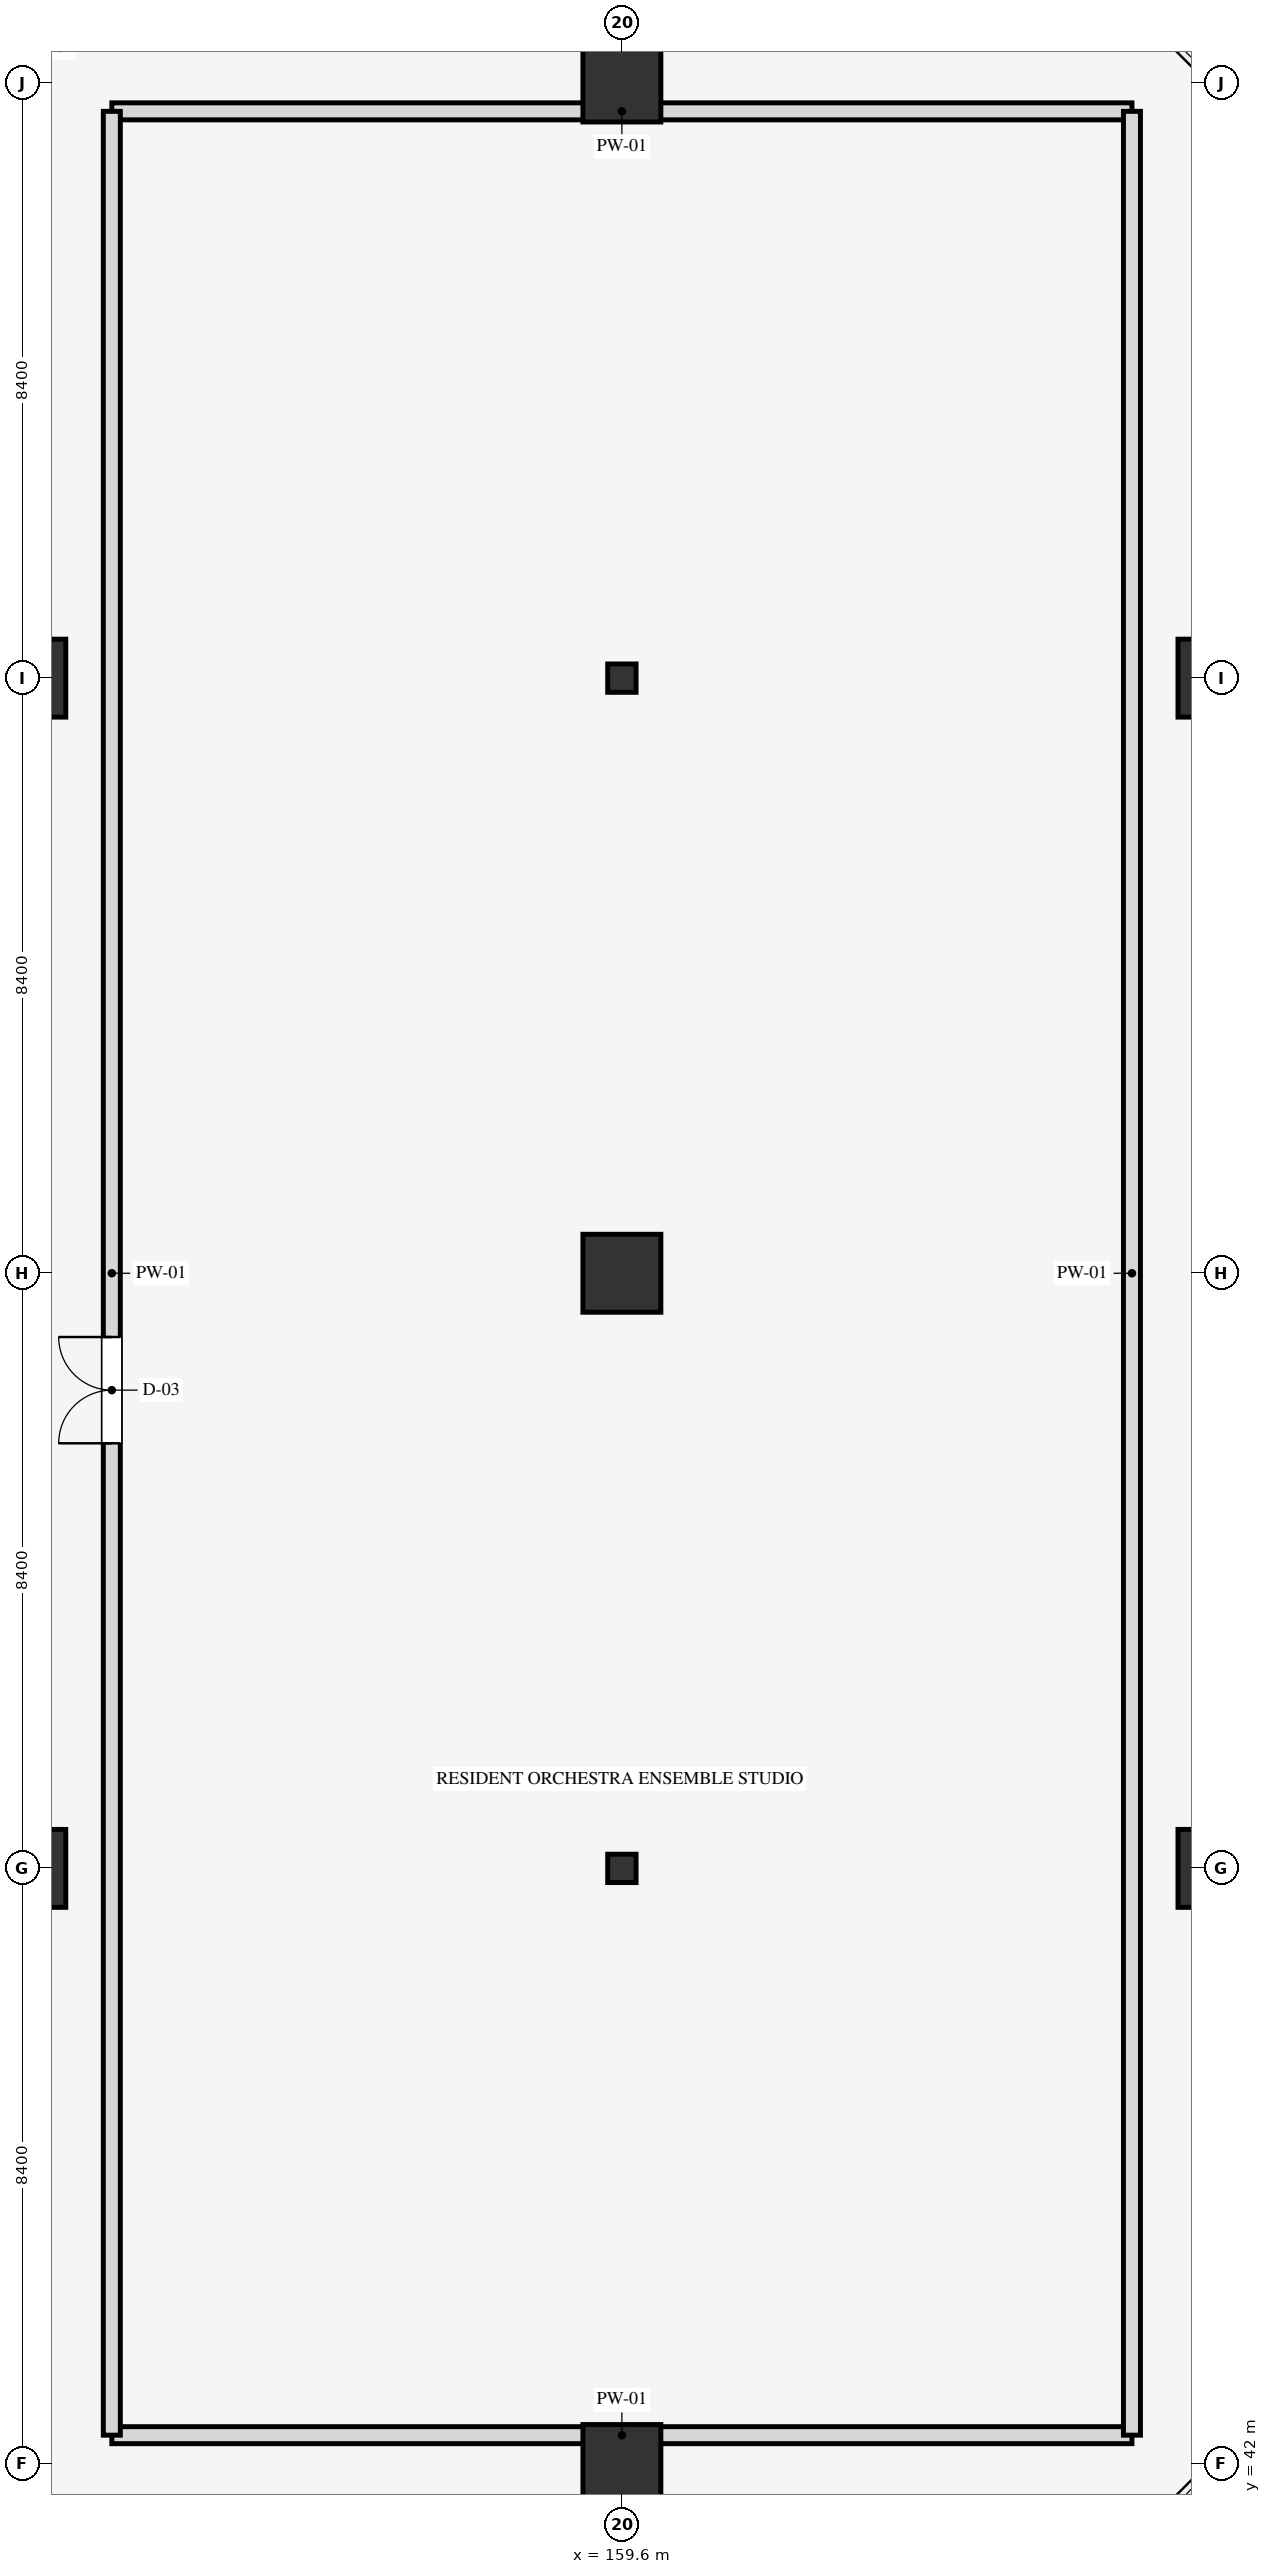
"""IFC4 building model, lengths in metres.
Left out: names, types, materials, properties, quantities, classifications, styles, units other than length and angle.
Written with IfcOpenShell. Run it as: python <this file> out.ifc"""

import sys

from ifc_helpers import new_model, si_unit, direction, frame, frame_2d, origin, origin_2d, place, context, subcontext, project, spatial, rectangle, i_section, extrude, element, fill, save


model = new_model("IFC4")
c1 = context("Model", 3, precision=1e-05, world=origin(), true_north=direction((0.0, 1.0)))
c2 = subcontext(c1, "Body", "Model", "MODEL_VIEW")
j1 = project(units=[si_unit("LENGTHUNIT", "METRE"), si_unit("PLANEANGLEUNIT", "RADIAN")], contexts=[c1])
p1 = place(None, origin())
s1 = spatial("IfcSite", under=j1, at=p1, CompositionType="ELEMENT")
p2 = place(p1, origin())
s2 = spatial("IfcBuilding", under=s1, at=p2, CompositionType="ELEMENT")
p3 = place(p2, frame((0.0, 0.0, 23.4)))
s3 = spatial("IfcBuildingStorey", under=s2, at=p3, CompositionType="ELEMENT", Elevation=23.4)
for number, where, z_axis, x_axis in (
    (1, (151.2, 50.4, 0.0), (0.0, 0.0, 1.0), (1.0, 0.0, 0.0)),
    (2, (151.2, 67.2, 0.0), (0.0, 0.0, 1.0), (1.0, 0.0, 0.0)),
    (3, (159.6, 42.0, 0.0), (0.0, 0.0, 1.0), (1.0, 0.0, 0.0)),
):
    element("IfcColumn", number, at=place(p3, frame(where, z_axis=z_axis, x_axis=x_axis)), inside=s3, PredefinedType="COLUMN", context=c2, shape_type="SweptSolid", body=[
        extrude(rectangle(XDim=1.1, YDim=1.1, at=origin_2d()), origin(), (0.0, 0.0, 1.0), 4.5),
    ])
p4 = place(p3, frame((159.6, 50.4, 0.0), z_axis=(0.0, 0.0, 1.0), x_axis=(1.0, 0.0, 0.0)))
e4 = element("IfcColumn", 4, at=p4, inside=s3, PredefinedType="COLUMN", context=c2, shape_type="SweptSolid", body=[
    extrude(i_section(OverallWidth=0.4, OverallDepth=0.4, WebThickness=0.013, FlangeThickness=0.021, FilletRadius=0.022, at=origin_2d()), origin(), (0.0, 0.0, 1.0), 4.5),
])
p5 = place(p3, frame((159.6, 58.8, 0.0), z_axis=(0.0, 0.0, 1.0), x_axis=(1.0, 0.0, 0.0)))
e5 = element("IfcColumn", 5, at=p5, inside=s3, PredefinedType="COLUMN", context=c2, shape_type="SweptSolid", body=[
    extrude(rectangle(XDim=1.1, YDim=1.1, at=origin_2d()), origin(), (0.0, 0.0, 1.0), 4.5),
])
p6 = place(p3, frame((159.6, 67.2, 0.0), z_axis=(0.0, 0.0, 1.0), x_axis=(1.0, 0.0, 0.0)))
e6 = element("IfcColumn", 6, at=p6, inside=s3, PredefinedType="COLUMN", context=c2, shape_type="SweptSolid", body=[
    extrude(i_section(OverallWidth=0.4, OverallDepth=0.4, WebThickness=0.013, FlangeThickness=0.021, FilletRadius=0.022, at=origin_2d()), origin(), (0.0, 0.0, 1.0), 4.5),
])
for number, where, z_axis, x_axis in (
    (7, (159.6, 75.6, 0.0), (0.0, 0.0, 1.0), (1.0, 0.0, 0.0)),
    (8, (168.0, 50.4, 0.0), (0.0, 0.0, 1.0), (1.0, 0.0, 0.0)),
    (9, (168.0, 67.2, 0.0), (0.0, 0.0, 1.0), (1.0, 0.0, 0.0)),
):
    element("IfcColumn", number, at=place(p3, frame(where, z_axis=z_axis, x_axis=x_axis)), inside=s3, PredefinedType="COLUMN", context=c2, shape_type="SweptSolid", body=[
        extrude(rectangle(XDim=1.1, YDim=1.1, at=origin_2d()), origin(), (0.0, 0.0, 1.0), 4.5),
    ])
for number, where, z_axis, x_axis in (
    (10, (152.4, 42.4, 0.0), (0.0, 0.0, 1.0), (1.0, 0.0, 0.0)),
    (11, (152.4, 75.2, 0.0), (0.0, 0.0, 1.0), (1.0, 0.0, 0.0)),
):
    element("IfcWall", number, at=place(p3, frame(where, z_axis=z_axis, x_axis=x_axis)), inside=s3, PredefinedType="PARTITIONING", context=c2, shape_type="SweptSolid", body=[
        extrude(rectangle(XDim=14.4, YDim=0.24, at=frame_2d((7.2, 0.0))), origin(), (0.0, 0.0, 1.0), 3.54),
    ])
p7 = place(p3, frame((152.4, 42.4, 0.0), z_axis=(0.0, 0.0, 1.0), x_axis=(0.0, 1.0, 0.0)))
e12 = element("IfcWall", 12, at=p7, inside=s3, PredefinedType="PARTITIONING", context=c2, shape_type="SweptSolid", body=[
    extrude(rectangle(XDim=32.8, YDim=0.24, at=frame_2d((16.4, 0.0))), origin(), (0.0, 0.0, 1.0), 3.54),
])
p8 = place(p7, frame((14.0, 0.0, 0.0)))
e13 = element("IfcOpeningElement", 13, at=p8, cuts=e12, PredefinedType="OPENING", context=c2, shape_type="SweptSolid", body=[
    extrude(rectangle(XDim=1.5, YDim=2.2, at=frame_2d((0.75, 1.1))), frame((0.0, 0.13, 0.0), z_axis=(0.0, -1.0, 0.0), x_axis=(1.0, 0.0, 0.0)), (0.0, 0.0, 1.0), 0.26),
])
p9 = place(p3, frame((166.8, 42.4, 0.0), z_axis=(0.0, 0.0, 1.0), x_axis=(0.0, 1.0, 0.0)))
e14 = element("IfcWall", 14, at=p9, inside=s3, PredefinedType="PARTITIONING", context=c2, shape_type="SweptSolid", body=[
    extrude(rectangle(XDim=32.8, YDim=0.24, at=frame_2d((16.4, 0.0))), origin(), (0.0, 0.0, 1.0), 3.54),
])
p10 = place(p8, origin())
e15 = element("IfcDoor", 15, at=p10, inside=s3, OperationType="DOUBLE_DOOR_SINGLE_SWING", PredefinedType="DOOR", context=c2, shape_type="SweptSolid", body=[
    extrude(rectangle(XDim=1.5, YDim=2.2, at=frame_2d((0.75, 1.1))), frame((0.0, 0.025, 0.0), z_axis=(0.0, -1.0, 0.0), x_axis=(1.0, 0.0, 0.0)), (0.0, 0.0, 1.0), 0.05),
])
fill(e13, e15)
save(model, sys.argv[1])
